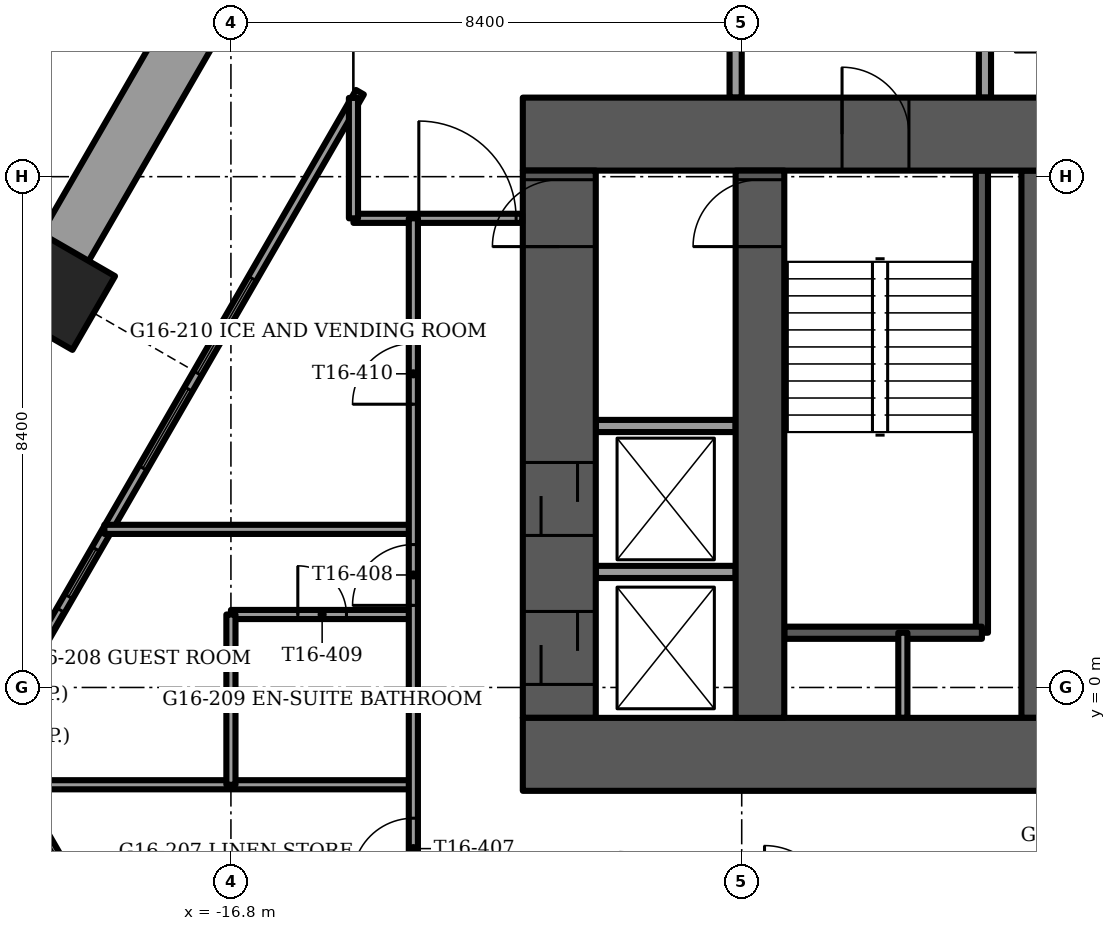
"""IFC4 building model, lengths in metres.
Left out: names, types, materials, properties, quantities, classifications, styles, units other than length and angle.
Written with IfcOpenShell. Run it as: python <this file> out.ifc"""

import sys

from ifc_helpers import new_model, si_unit, direction, frame, frame_2d, origin, origin_2d, place, context, subcontext, project, spatial, rectangle, extrude, element, fill, save


model = new_model("IFC4")
c1 = context("Model", 3, precision=1e-05, world=origin(), true_north=direction((0.0, 1.0)))
c2 = subcontext(c1, "Body", "Model", "MODEL_VIEW")
j1 = project(units=[si_unit("LENGTHUNIT", "METRE"), si_unit("PLANEANGLEUNIT", "RADIAN")], contexts=[c1])
p1 = place(None, origin())
s1 = spatial("IfcSite", under=j1, at=p1, CompositionType="ELEMENT")
p2 = place(p1, origin())
s2 = spatial("IfcBuilding", under=s1, at=p2, CompositionType="ELEMENT")
p3 = place(p2, frame((0.0, 0.0, 65.5)))
s3 = spatial("IfcBuildingStorey", under=s2, at=p3, CompositionType="ELEMENT", Elevation=65.5)
p4 = place(p3, frame((-19.662, 6.508, -1.2), z_axis=(0.0, 0.0, 1.0), x_axis=(0.5, 0.866025403784, 0.0)))
e1 = element("IfcColumn", 1, at=p4, inside=s3, PredefinedType="COLUMN", context=c2, shape_type="SweptSolid", body=[
    extrude(rectangle(XDim=1.4, YDim=1.4, at=origin_2d()), origin(), (0.0, 0.0, 1.0), 3.75),
])
p5 = place(p3, frame((-12.0, -1.1, -0.3), z_axis=(0.0, 0.0, 1.0), x_axis=(1.0, 0.0, 0.0)))
e2 = element("IfcWall", 2, at=p5, inside=s3, PredefinedType="SHEAR", context=c2, shape_type="SweptSolid", body=[
    extrude(rectangle(XDim=24.0, YDim=1.2, at=frame_2d((12.0, 0.0))), origin(), (0.0, 0.0, 1.0), 3.75),
])
p6 = place(p5, frame((11.2, 0.0, 0.0)))
e3 = element("IfcOpeningElement", 3, at=p6, cuts=e2, PredefinedType="OPENING", context=c2, shape_type="SweptSolid", body=[
    extrude(rectangle(XDim=1.6, YDim=2.1, at=frame_2d((0.8, 1.05))), frame((0.0, 0.6, 0.0), z_axis=(0.0, -1.0, 0.0), x_axis=(1.0, 0.0, 0.0)), (0.0, 0.0, 1.0), 1.2),
])
p7 = place(p3, frame((-12.0, 9.1, -0.3), z_axis=(0.0, 0.0, 1.0), x_axis=(1.0, 0.0, 0.0)))
e4 = element("IfcWall", 4, at=p7, inside=s3, PredefinedType="SHEAR", context=c2, shape_type="SweptSolid", body=[
    extrude(rectangle(XDim=24.0, YDim=1.2, at=frame_2d((12.0, 0.0))), origin(), (0.0, 0.0, 1.0), 3.75),
])
p8 = place(p7, frame((11.2, 0.0, 0.0)))
e5 = element("IfcOpeningElement", 5, at=p8, cuts=e4, PredefinedType="OPENING", context=c2, shape_type="SweptSolid", body=[
    extrude(rectangle(XDim=1.6, YDim=2.1, at=frame_2d((0.8, 1.05))), frame((0.0, 0.6, 0.0), z_axis=(0.0, -1.0, 0.0), x_axis=(1.0, 0.0, 0.0)), (0.0, 0.0, 1.0), 1.2),
])
p9 = place(p7, frame((5.25, 0.0, 0.0)))
e6 = element("IfcOpeningElement", 6, at=p9, cuts=e4, PredefinedType="OPENING", context=c2, shape_type="SweptSolid", body=[
    extrude(rectangle(XDim=1.1, YDim=2.1, at=frame_2d((0.55, 1.05))), frame((0.0, 0.6, 0.0), z_axis=(0.0, -1.0, 0.0), x_axis=(1.0, 0.0, 0.0)), (0.0, 0.0, 1.0), 1.2),
])
p10 = place(p7, frame((17.65, 0.0, 0.0)))
e7 = element("IfcOpeningElement", 7, at=p10, cuts=e4, PredefinedType="OPENING", context=c2, shape_type="SweptSolid", body=[
    extrude(rectangle(XDim=1.1, YDim=2.1, at=frame_2d((0.55, 1.05))), frame((0.0, 0.6, 0.0), z_axis=(0.0, -1.0, 0.0), x_axis=(1.0, 0.0, 0.0)), (0.0, 0.0, 1.0), 1.2),
])
p11 = place(p3, frame((-8.1, -0.5, -0.3), z_axis=(0.0, 0.0, 1.0), x_axis=(0.0, 1.0, 0.0)))
e8 = element("IfcWall", 8, at=p11, inside=s3, PredefinedType="SHEAR", context=c2, shape_type="SweptSolid", body=[
    extrude(rectangle(XDim=9.0, YDim=0.8, at=frame_2d((4.5, 0.0))), origin(), (0.0, 0.0, 1.0), 3.75),
])
p12 = place(p11, frame((7.75, 0.0, 0.0)))
e9 = element("IfcOpeningElement", 9, at=p12, cuts=e8, PredefinedType="OPENING", context=c2, shape_type="SweptSolid", body=[
    extrude(rectangle(XDim=1.1, YDim=2.1, at=frame_2d((0.55, 1.05))), frame((0.0, 0.4, 0.0), z_axis=(0.0, -1.0, 0.0), x_axis=(1.0, 0.0, 0.0)), (0.0, 0.0, 1.0), 0.8),
])
p13 = place(p3, frame((-3.6, -0.5, -0.3), z_axis=(0.0, 0.0, 1.0), x_axis=(0.0, 1.0, 0.0)))
e10 = element("IfcWall", 10, at=p13, inside=s3, PredefinedType="SHEAR", context=c2, shape_type="SweptSolid", body=[
    extrude(rectangle(XDim=9.0, YDim=0.4, at=frame_2d((4.5, 0.0))), origin(), (0.0, 0.0, 1.0), 3.75),
])
p14 = place(p3, frame((-11.4, -0.5, -0.3), z_axis=(0.0, 0.0, 1.0), x_axis=(0.0, 1.0, 0.0)))
e11 = element("IfcWall", 11, at=p14, inside=s3, PredefinedType="SHEAR", context=c2, shape_type="SweptSolid", body=[
    extrude(rectangle(XDim=9.0, YDim=1.2, at=frame_2d((4.5, 0.0))), origin(), (0.0, 0.0, 1.0), 3.75),
])
p15 = place(p14, frame((7.75, 0.0, 0.0)))
e12 = element("IfcOpeningElement", 12, at=p15, cuts=e11, PredefinedType="OPENING", context=c2, shape_type="SweptSolid", body=[
    extrude(rectangle(XDim=1.1, YDim=2.1, at=frame_2d((0.55, 1.05))), frame((0.0, 0.6, 0.0), z_axis=(0.0, -1.0, 0.0), x_axis=(1.0, 0.0, 0.0)), (0.0, 0.0, 1.0), 1.2),
])
p16 = place(p14, frame((0.55, 0.0, 0.0)))
e13 = element("IfcOpeningElement", 13, at=p16, cuts=e11, PredefinedType="OPENING", context=c2, shape_type="SweptSolid", body=[
    extrude(rectangle(XDim=1.2, YDim=2.1, at=frame_2d((0.6, 1.05))), frame((0.0, 0.6, 0.0), z_axis=(0.0, -1.0, 0.0), x_axis=(1.0, 0.0, 0.0)), (0.0, 0.0, 1.0), 1.2),
])
p17 = place(p14, frame((3.0, 0.0, 0.0)))
e14 = element("IfcOpeningElement", 14, at=p17, cuts=e11, PredefinedType="OPENING", context=c2, shape_type="SweptSolid", body=[
    extrude(rectangle(XDim=1.2, YDim=2.1, at=frame_2d((0.6, 1.05))), frame((0.0, 0.6, 0.0), z_axis=(0.0, -1.0, 0.0), x_axis=(1.0, 0.0, 0.0)), (0.0, 0.0, 1.0), 1.2),
])
p18 = place(p3, frame((-16.018, 13.319, 0.0), z_axis=(0.0, 0.0, 1.0), x_axis=(-0.499997206141, -0.866027016814, 0.0)))
e15 = element("IfcWall", 15, at=p18, inside=s3, PredefinedType="PARAPET", context=c2, shape_type="SweptSolid", body=[
    extrude(rectangle(XDim=7.051, YDim=0.9, at=frame_2d((3.525, 0.0))), origin(), (0.0, 0.0, 1.0), 1.1),
])
p19 = place(p3, frame((-14.679, 9.789, 0.0), z_axis=(0.0, 0.0, 1.0), x_axis=(-0.500001004067, -0.866024824085, 0.0)))
e16 = element("IfcWall", 16, at=p19, inside=s3, PredefinedType="SOLIDWALL", context=c2, shape_type="SweptSolid", body=[
    extrude(rectangle(XDim=11.633, YDim=0.15, at=frame_2d((5.817, 0.0))), origin(), (0.0, 0.0, 1.0), 3.45),
])
p20 = place(p19, frame((3.538, 0.0, 0.15)))
e17 = element("IfcOpeningElement", 17, at=p20, cuts=e16, PredefinedType="OPENING", context=c2, shape_type="SweptSolid", body=[
    extrude(rectangle(XDim=1.8, YDim=2.2, at=frame_2d((0.9, 1.1))), frame((0.0, 0.075, 0.0), z_axis=(0.0, -1.0, 0.0), x_axis=(1.0, 0.0, 0.0)), (0.0, 0.0, 1.0), 0.15),
])
p21 = place(p19, frame((5.638, 0.0, 0.15)))
e18 = element("IfcOpeningElement", 18, at=p21, cuts=e16, PredefinedType="OPENING", context=c2, shape_type="SweptSolid", body=[
    extrude(rectangle(XDim=1.5, YDim=2.2, at=frame_2d((0.75, 1.1))), frame((0.0, 0.075, 0.0), z_axis=(0.0, -1.0, 0.0), x_axis=(1.0, 0.0, 0.0)), (0.0, 0.0, 1.0), 0.15),
])
p22 = place(p19, frame((8.677, 0.0, 0.15)))
e19 = element("IfcOpeningElement", 19, at=p22, cuts=e16, PredefinedType="OPENING", context=c2, shape_type="SweptSolid", body=[
    extrude(rectangle(XDim=0.9, YDim=2.2, at=frame_2d((0.45, 1.1))), frame((0.0, 0.075, 0.0), z_axis=(0.0, -1.0, 0.0), x_axis=(1.0, 0.0, 0.0)), (0.0, 0.0, 1.0), 0.15),
])
p23 = place(p19, frame((9.838, 0.0, 0.0)))
e20 = element("IfcOpeningElement", 20, at=p23, cuts=e16, PredefinedType="OPENING", context=c2, shape_type="SweptSolid", body=[
    extrude(rectangle(XDim=1.5, YDim=2.4, at=frame_2d((0.75, 1.2))), frame((0.0, 0.075, 0.0), z_axis=(0.0, -1.0, 0.0), x_axis=(1.0, 0.0, 0.0)), (0.0, 0.0, 1.0), 0.15),
])
p24 = place(p3, frame((-20.496, -1.351, 0.0), z_axis=(0.0, 0.0, 1.0), x_axis=(0.500010091595, -0.866019577321, 0.0)))
e21 = element("IfcWall", 21, at=p24, inside=s3, PredefinedType="SOLIDWALL", context=c2, shape_type="SweptSolid", body=[
    extrude(rectangle(XDim=11.633, YDim=0.15, at=frame_2d((5.816, 0.0))), origin(), (0.0, 0.0, 1.0), 3.45),
])
p25 = place(p24, frame((0.978, 0.0, 0.15)))
e22 = element("IfcOpeningElement", 22, at=p25, cuts=e21, PredefinedType="OPENING", context=c2, shape_type="SweptSolid", body=[
    extrude(rectangle(XDim=0.9, YDim=2.2, at=frame_2d((0.45, 1.1))), frame((0.0, 0.075, 0.0), z_axis=(0.0, -1.0, 0.0), x_axis=(1.0, 0.0, 0.0)), (0.0, 0.0, 1.0), 0.15),
])
p26 = place(p24, frame((3.078, 0.0, 0.15)))
e23 = element("IfcOpeningElement", 23, at=p26, cuts=e21, PredefinedType="OPENING", context=c2, shape_type="SweptSolid", body=[
    extrude(rectangle(XDim=1.5, YDim=2.2, at=frame_2d((0.75, 1.1))), frame((0.0, 0.075, 0.0), z_axis=(0.0, -1.0, 0.0), x_axis=(1.0, 0.0, 0.0)), (0.0, 0.0, 1.0), 0.15),
])
p27 = place(p24, frame((6.501, 0.0, 0.15)))
e24 = element("IfcOpeningElement", 24, at=p27, cuts=e21, PredefinedType="OPENING", context=c2, shape_type="SweptSolid", body=[
    extrude(rectangle(XDim=1.8, YDim=2.2, at=frame_2d((0.9, 1.1))), frame((0.0, 0.075, 0.0), z_axis=(0.0, -1.0, 0.0), x_axis=(1.0, 0.0, 0.0)), (0.0, 0.0, 1.0), 0.15),
])
p28 = place(p3, frame((-4.45, 0.9, -0.3), z_axis=(0.0, 0.0, 1.0), x_axis=(0.0, 1.0, 0.0)))
e25 = element("IfcWall", 25, at=p28, inside=s3, PredefinedType="SOLIDWALL", context=c2, shape_type="SweptSolid", body=[
    extrude(rectangle(XDim=7.6, YDim=0.2, at=frame_2d((3.8, 0.0))), origin(), (0.0, 0.0, 1.0), 3.75),
])
p29 = place(p3, frame((-7.7, 0.9, -0.3), z_axis=(0.0, 0.0, 1.0), x_axis=(1.0, 0.0, 0.0)))
e26 = element("IfcWall", 26, at=p29, inside=s3, PredefinedType="SOLIDWALL", context=c2, shape_type="SweptSolid", body=[
    extrude(rectangle(XDim=3.25, YDim=0.2, at=frame_2d((1.625, 0.0))), origin(), (0.0, 0.0, 1.0), 3.75),
])
p30 = place(p3, frame((-5.75, -0.5, 0.0), z_axis=(0.0, 0.0, 1.0), x_axis=(0.0, 1.0, 0.0)))
e27 = element("IfcWall", 27, at=p30, inside=s3, PredefinedType="PARTITIONING", context=c2, shape_type="SweptSolid", body=[
    extrude(rectangle(XDim=1.4, YDim=0.15, at=frame_2d((0.7, 0.0))), origin(), (0.0, 0.0, 1.0), 3.45),
])
p31 = place(p3, frame((-8.5, 9.7, 0.0), z_axis=(0.0, 0.0, 1.0), x_axis=(0.0, 1.0, 0.0)))
e28 = element("IfcWall", 28, at=p31, inside=s3, PredefinedType="PARTITIONING", context=c2, shape_type="SweptSolid", body=[
    extrude(rectangle(XDim=3.9, YDim=0.2, at=frame_2d((1.95, 0.0))), origin(), (0.0, 0.0, 1.0), 3.45),
])
p32 = place(p31, frame((1.35, 0.0, 0.0)))
e29 = element("IfcOpeningElement", 29, at=p32, cuts=e28, PredefinedType="OPENING", context=c2, shape_type="SweptSolid", body=[
    extrude(rectangle(XDim=1.2, YDim=2.1, at=frame_2d((0.6, 1.05))), frame((0.0, 0.1, 0.0), z_axis=(0.0, -1.0, 0.0), x_axis=(1.0, 0.0, 0.0)), (0.0, 0.0, 1.0), 0.2),
])
p33 = place(p3, frame((-4.4, 9.7, 0.0), z_axis=(0.0, 0.0, 1.0), x_axis=(0.0, 1.0, 0.0)))
e30 = element("IfcWall", 30, at=p33, inside=s3, PredefinedType="PARTITIONING", context=c2, shape_type="SweptSolid", body=[
    extrude(rectangle(XDim=3.9, YDim=0.2, at=frame_2d((1.95, 0.0))), origin(), (0.0, 0.0, 1.0), 3.45),
])
p34 = place(p33, frame((1.35, 0.0, 0.0)))
e31 = element("IfcOpeningElement", 31, at=p34, cuts=e30, PredefinedType="OPENING", context=c2, shape_type="SweptSolid", body=[
    extrude(rectangle(XDim=1.2, YDim=2.1, at=frame_2d((0.6, 1.05))), frame((0.0, 0.1, 0.0), z_axis=(0.0, -1.0, 0.0), x_axis=(1.0, 0.0, 0.0)), (0.0, 0.0, 1.0), 0.2),
])
for number, where, z_axis, x_axis in (
    (32, (-10.8, 1.9, 0.0), (0.0, 0.0, 1.0), (1.0, 0.0, 0.0)),
    (33, (-10.8, 4.3, 0.0), (0.0, 0.0, 1.0), (1.0, 0.0, 0.0)),
):
    element("IfcWall", number, at=place(p3, frame(where, z_axis=z_axis, x_axis=x_axis)), inside=s3, PredefinedType="PARTITIONING", context=c2, shape_type="SweptSolid", body=[
        extrude(rectangle(XDim=2.3, YDim=0.2, at=frame_2d((1.15, 0.0))), origin(), (0.0, 0.0, 1.0), 3.45),
    ])
p35 = place(p3, frame((-20.404, -1.6, 0.0), z_axis=(0.0, 0.0, 1.0), x_axis=(1.0, 0.0, 0.0)))
e34 = element("IfcWall", 34, at=p35, inside=s3, PredefinedType="PARTITIONING", context=c2, shape_type="SweptSolid", body=[
    extrude(rectangle(XDim=6.604, YDim=0.15, at=frame_2d((3.302, 0.0))), origin(), (0.0, 0.0, 1.0), 3.45),
])
p36 = place(p3, frame((-16.8, 1.2, 0.0), z_axis=(0.0, 0.0, 1.0), x_axis=(1.0, 0.0, 0.0)))
e35 = element("IfcWall", 35, at=p36, inside=s3, PredefinedType="PARTITIONING", context=c2, shape_type="SweptSolid", body=[
    extrude(rectangle(XDim=3.0, YDim=0.15, at=frame_2d((1.5, 0.0))), origin(), (0.0, 0.0, 1.0), 3.45),
])
p37 = place(p36, frame((1.1, 0.0, 0.0)))
e36 = element("IfcOpeningElement", 36, at=p37, cuts=e35, PredefinedType="OPENING", context=c2, shape_type="SweptSolid", body=[
    extrude(rectangle(XDim=0.8, YDim=2.1, at=frame_2d((0.4, 1.05))), frame((0.0, 0.075, 0.0), z_axis=(0.0, -1.0, 0.0), x_axis=(1.0, 0.0, 0.0)), (0.0, 0.0, 1.0), 0.15),
])
p38 = place(p3, frame((-18.881, 2.6, 0.0), z_axis=(0.0, 0.0, 1.0), x_axis=(1.0, 0.0, 0.0)))
e37 = element("IfcWall", 37, at=p38, inside=s3, PredefinedType="PARTITIONING", context=c2, shape_type="SweptSolid", body=[
    extrude(rectangle(XDim=5.081, YDim=0.15, at=frame_2d((2.541, 0.0))), origin(), (0.0, 0.0, 1.0), 3.45),
])
p39 = place(p3, frame((-14.785, 7.715, 0.0), z_axis=(0.0, 0.0, 1.0), x_axis=(1.0, 0.0, 0.0)))
e38 = element("IfcWall", 38, at=p39, inside=s3, PredefinedType="PARTITIONING", context=c2, shape_type="SweptSolid", body=[
    extrude(rectangle(XDim=2.775, YDim=0.15, at=frame_2d((1.387, 0.0))), origin(), (0.0, 0.0, 1.0), 3.45),
])
p40 = place(p39, frame((1.075, 0.0, 0.0)))
e39 = element("IfcOpeningElement", 39, at=p40, cuts=e38, PredefinedType="OPENING", context=c2, shape_type="SweptSolid", body=[
    extrude(rectangle(XDim=1.6, YDim=2.1, at=frame_2d((0.8, 1.05))), frame((0.0, 0.075, 0.0), z_axis=(0.0, -1.0, 0.0), x_axis=(1.0, 0.0, 0.0)), (0.0, 0.0, 1.0), 0.15),
])
p41 = place(p3, frame((-13.8, -3.7, 0.0), z_axis=(0.0, 0.0, 1.0), x_axis=(0.0, 1.0, 0.0)))
e40 = element("IfcWall", 40, at=p41, inside=s3, PredefinedType="PARTITIONING", context=c2, shape_type="SweptSolid", body=[
    extrude(rectangle(XDim=11.415, YDim=0.15, at=frame_2d((5.708, 0.0))), origin(), (0.0, 0.0, 1.0), 3.45),
])
p42 = place(p41, frame((0.55, 0.0, 0.0)))
e41 = element("IfcOpeningElement", 41, at=p42, cuts=e40, PredefinedType="OPENING", context=c2, shape_type="SweptSolid", body=[
    extrude(rectangle(XDim=1.0, YDim=2.1, at=frame_2d((0.5, 1.05))), frame((0.0, 0.075, 0.0), z_axis=(0.0, -1.0, 0.0), x_axis=(1.0, 0.0, 0.0)), (0.0, 0.0, 1.0), 0.15),
])
p43 = place(p41, frame((5.05, 0.0, 0.0)))
e42 = element("IfcOpeningElement", 42, at=p43, cuts=e40, PredefinedType="OPENING", context=c2, shape_type="SweptSolid", body=[
    extrude(rectangle(XDim=1.0, YDim=2.1, at=frame_2d((0.5, 1.05))), frame((0.0, 0.075, 0.0), z_axis=(0.0, -1.0, 0.0), x_axis=(1.0, 0.0, 0.0)), (0.0, 0.0, 1.0), 0.15),
])
p44 = place(p41, frame((8.358, 0.0, 0.0)))
e43 = element("IfcOpeningElement", 43, at=p44, cuts=e40, PredefinedType="OPENING", context=c2, shape_type="SweptSolid", body=[
    extrude(rectangle(XDim=1.0, YDim=2.1, at=frame_2d((0.5, 1.05))), frame((0.0, 0.075, 0.0), z_axis=(0.0, -1.0, 0.0), x_axis=(1.0, 0.0, 0.0)), (0.0, 0.0, 1.0), 0.15),
])
p45 = place(p3, frame((-14.785, 7.715, 0.0), z_axis=(0.0, 0.0, 1.0), x_axis=(0.0, 1.0, 0.0)))
e44 = element("IfcWall", 44, at=p45, inside=s3, PredefinedType="PARTITIONING", context=c2, shape_type="SweptSolid", body=[
    extrude(rectangle(XDim=1.98, YDim=0.15, at=frame_2d((0.99, 0.0))), origin(), (0.0, 0.0, 1.0), 3.45),
])
p46 = place(p3, frame((-16.8, -1.6, 0.0), z_axis=(0.0, 0.0, 1.0), x_axis=(0.0, 1.0, 0.0)))
e45 = element("IfcWall", 45, at=p46, inside=s3, PredefinedType="PARTITIONING", context=c2, shape_type="SweptSolid", body=[
    extrude(rectangle(XDim=2.8, YDim=0.15, at=frame_2d((1.4, 0.0))), origin(), (0.0, 0.0, 1.0), 3.45),
])
p47 = place(p20, origin())
e46 = element("IfcWindow", 46, at=p47, inside=s3, PartitioningType="SINGLE_PANEL", PredefinedType="WINDOW", context=c2, shape_type="SweptSolid", body=[
    extrude(rectangle(XDim=1.8, YDim=2.2, at=frame_2d((0.9, 1.1))), frame((0.0, 0.03, 0.0), z_axis=(0.0, -1.0, 0.0), x_axis=(1.0, 0.0, 0.0)), (0.0, 0.0, 1.0), 0.06),
])
fill(e17, e46)
p48 = place(p21, origin())
e47 = element("IfcWindow", 47, at=p48, inside=s3, PartitioningType="SINGLE_PANEL", PredefinedType="WINDOW", context=c2, shape_type="SweptSolid", body=[
    extrude(rectangle(XDim=1.5, YDim=2.2, at=frame_2d((0.75, 1.1))), frame((0.0, 0.03, 0.0), z_axis=(0.0, -1.0, 0.0), x_axis=(1.0, 0.0, 0.0)), (0.0, 0.0, 1.0), 0.06),
])
fill(e18, e47)
p49 = place(p22, origin())
e48 = element("IfcWindow", 48, at=p49, inside=s3, PartitioningType="SINGLE_PANEL", PredefinedType="WINDOW", context=c2, shape_type="SweptSolid", body=[
    extrude(rectangle(XDim=0.9, YDim=2.2, at=frame_2d((0.45, 1.1))), frame((0.0, 0.03, 0.0), z_axis=(0.0, -1.0, 0.0), x_axis=(1.0, 0.0, 0.0)), (0.0, 0.0, 1.0), 0.06),
])
fill(e19, e48)
p50 = place(p23, origin())
e49 = element("IfcDoor", 49, at=p50, inside=s3, OperationType="SLIDING_TO_LEFT", PredefinedType="DOOR", context=c2, shape_type="SweptSolid", body=[
    extrude(rectangle(XDim=1.5, YDim=2.4, at=frame_2d((0.75, 1.2))), frame((0.0, 0.025, 0.0), z_axis=(0.0, -1.0, 0.0), x_axis=(1.0, 0.0, 0.0)), (0.0, 0.0, 1.0), 0.05),
])
fill(e20, e49)
p51 = place(p25, origin())
e50 = element("IfcWindow", 50, at=p51, inside=s3, PartitioningType="SINGLE_PANEL", PredefinedType="WINDOW", context=c2, shape_type="SweptSolid", body=[
    extrude(rectangle(XDim=0.9, YDim=2.2, at=frame_2d((0.45, 1.1))), frame((0.0, 0.03, 0.0), z_axis=(0.0, -1.0, 0.0), x_axis=(1.0, 0.0, 0.0)), (0.0, 0.0, 1.0), 0.06),
])
fill(e22, e50)
p52 = place(p9, origin())
e51 = element("IfcDoor", 51, at=p52, inside=s3, OperationType="SINGLE_SWING_LEFT", PredefinedType="DOOR", context=c2, shape_type="SweptSolid", body=[
    extrude(rectangle(XDim=1.1, YDim=2.1, at=frame_2d((0.55, 1.05))), frame((0.0, 0.025, 0.0), z_axis=(0.0, -1.0, 0.0), x_axis=(1.0, 0.0, 0.0)), (0.0, 0.0, 1.0), 0.05),
])
fill(e6, e51)
p53 = place(p12, origin())
e52 = element("IfcDoor", 52, at=p53, inside=s3, OperationType="SINGLE_SWING_RIGHT", PredefinedType="DOOR", context=c2, shape_type="SweptSolid", body=[
    extrude(rectangle(XDim=1.1, YDim=2.1, at=frame_2d((0.55, 1.05))), frame((0.0, 0.025, 0.0), z_axis=(0.0, -1.0, 0.0), x_axis=(1.0, 0.0, 0.0)), (0.0, 0.0, 1.0), 0.05),
])
fill(e9, e52)
p54 = place(p15, origin())
e53 = element("IfcDoor", 53, at=p54, inside=s3, OperationType="SINGLE_SWING_LEFT", PredefinedType="DOOR", context=c2, shape_type="SweptSolid", body=[
    extrude(rectangle(XDim=1.1, YDim=2.1, at=frame_2d((0.55, 1.05))), frame((0.0, 0.025, 0.0), z_axis=(0.0, -1.0, 0.0), x_axis=(1.0, 0.0, 0.0)), (0.0, 0.0, 1.0), 0.05),
])
fill(e12, e53)
p55 = place(p16, origin())
e54 = element("IfcDoor", 54, at=p55, inside=s3, OperationType="SLIDING_TO_LEFT", PredefinedType="DOOR", context=c2, shape_type="SweptSolid", body=[
    extrude(rectangle(XDim=1.2, YDim=2.1, at=frame_2d((0.6, 1.05))), frame((0.0, 0.025, 0.0), z_axis=(0.0, -1.0, 0.0), x_axis=(1.0, 0.0, 0.0)), (0.0, 0.0, 1.0), 0.05),
])
fill(e13, e54)
p56 = place(p17, origin())
e55 = element("IfcDoor", 55, at=p56, inside=s3, OperationType="SLIDING_TO_LEFT", PredefinedType="DOOR", context=c2, shape_type="SweptSolid", body=[
    extrude(rectangle(XDim=1.2, YDim=2.1, at=frame_2d((0.6, 1.05))), frame((0.0, 0.025, 0.0), z_axis=(0.0, -1.0, 0.0), x_axis=(1.0, 0.0, 0.0)), (0.0, 0.0, 1.0), 0.05),
])
fill(e14, e55)
p57 = place(p42, origin())
e56 = element("IfcDoor", 56, at=p57, inside=s3, OperationType="SINGLE_SWING_LEFT", PredefinedType="DOOR", context=c2, shape_type="SweptSolid", body=[
    extrude(rectangle(XDim=1.0, YDim=2.1, at=frame_2d((0.5, 1.05))), frame((0.0, 0.025, 0.0), z_axis=(0.0, -1.0, 0.0), x_axis=(1.0, 0.0, 0.0)), (0.0, 0.0, 1.0), 0.05),
])
fill(e41, e56)
p58 = place(p43, origin())
e57 = element("IfcDoor", 57, at=p58, inside=s3, OperationType="SINGLE_SWING_RIGHT", PredefinedType="DOOR", context=c2, shape_type="SweptSolid", body=[
    extrude(rectangle(XDim=1.0, YDim=2.1, at=frame_2d((0.5, 1.05))), frame((0.0, 0.025, 0.0), z_axis=(0.0, -1.0, 0.0), x_axis=(1.0, 0.0, 0.0)), (0.0, 0.0, 1.0), 0.05),
])
fill(e42, e57)
p59 = place(p37, origin())
e58 = element("IfcDoor", 58, at=p59, inside=s3, OperationType="SINGLE_SWING_RIGHT", PredefinedType="DOOR", context=c2, shape_type="SweptSolid", body=[
    extrude(rectangle(XDim=0.8, YDim=2.1, at=frame_2d((0.4, 1.05))), frame((0.0, 0.025, 0.0), z_axis=(0.0, -1.0, 0.0), x_axis=(1.0, 0.0, 0.0)), (0.0, 0.0, 1.0), 0.05),
])
fill(e36, e58)
p60 = place(p44, origin())
e59 = element("IfcDoor", 59, at=p60, inside=s3, OperationType="SINGLE_SWING_LEFT", PredefinedType="DOOR", context=c2, shape_type="SweptSolid", body=[
    extrude(rectangle(XDim=1.0, YDim=2.1, at=frame_2d((0.5, 1.05))), frame((0.0, 0.025, 0.0), z_axis=(0.0, -1.0, 0.0), x_axis=(1.0, 0.0, 0.0)), (0.0, 0.0, 1.0), 0.05),
])
fill(e43, e59)
p61 = place(p40, origin())
e60 = element("IfcDoor", 60, at=p61, inside=s3, OperationType="DOUBLE_DOOR_SINGLE_SWING", PredefinedType="DOOR", context=c2, shape_type="SweptSolid", body=[
    extrude(rectangle(XDim=1.6, YDim=2.1, at=frame_2d((0.8, 1.05))), frame((0.0, 0.025, 0.0), z_axis=(0.0, -1.0, 0.0), x_axis=(1.0, 0.0, 0.0)), (0.0, 0.0, 1.0), 0.05),
])
fill(e39, e60)
save(model, sys.argv[1])
